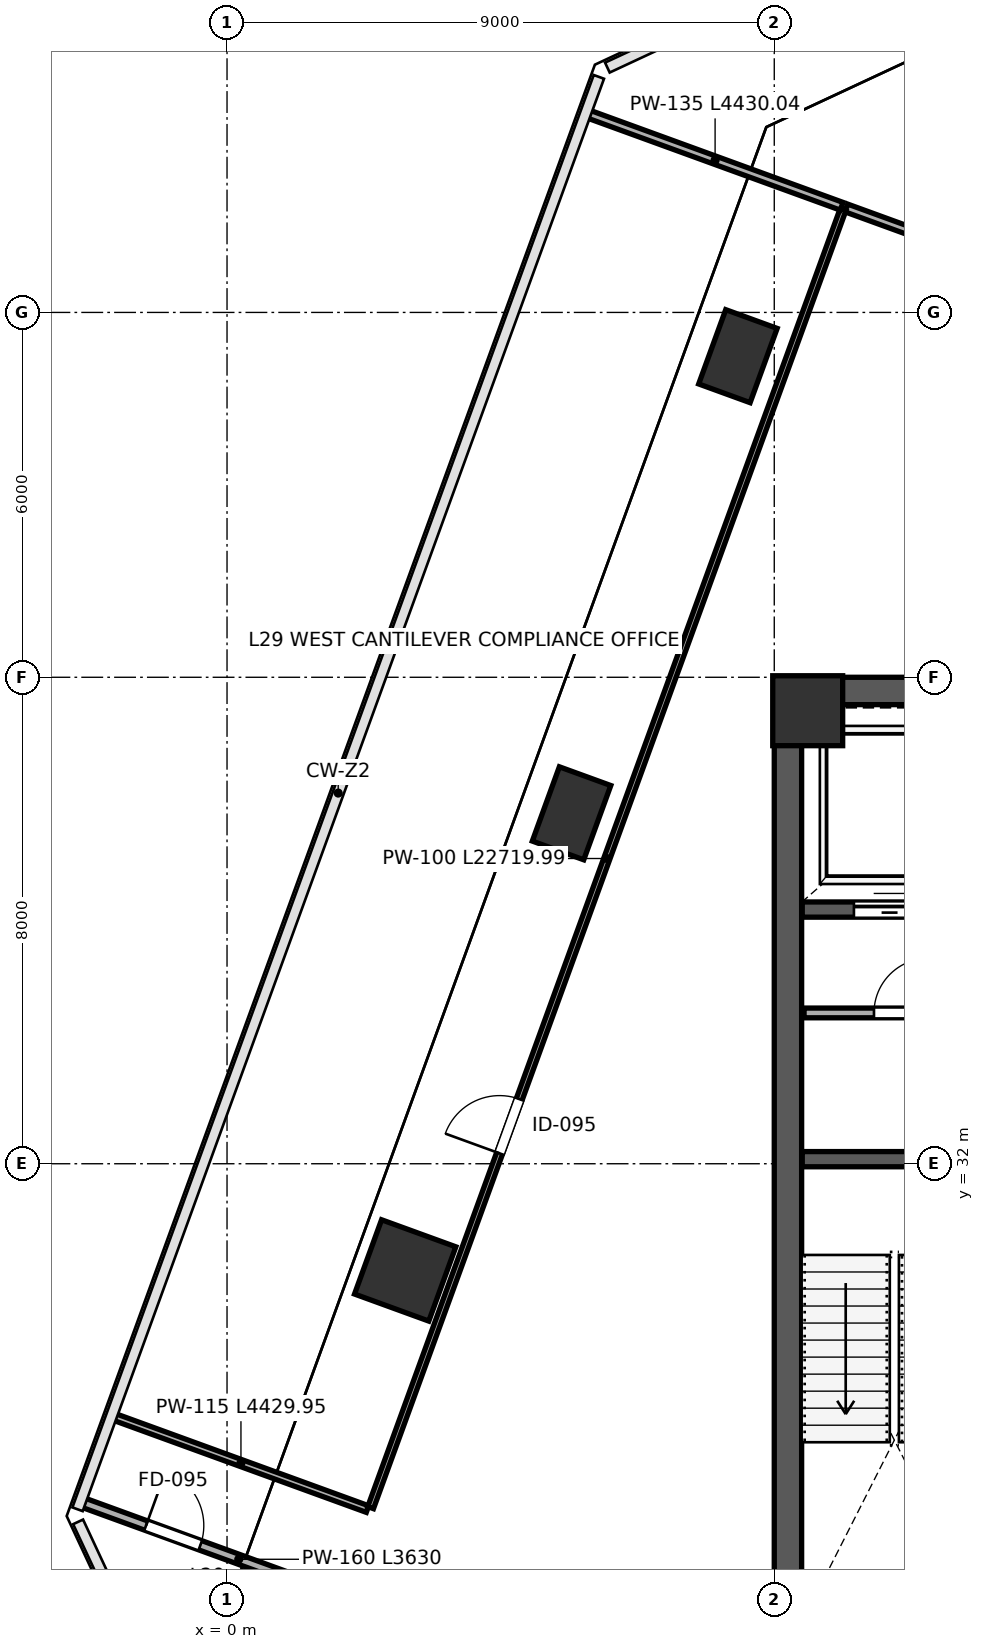
"""IFC4 building model, lengths in metres.
Left out: names, types, materials, properties, quantities, classifications, styles, units other than length and angle.
Written with IfcOpenShell. Run it as: python <this file> out.ifc"""

import sys

from ifc_helpers import new_model, si_unit, direction, frame, frame_2d, origin, origin_2d, place, context, subcontext, project, spatial, rectangle, extrude, clip, halfspace, source, transform, mapped, element, fill, save


model = new_model("IFC4")
c1 = context("Model", 3, precision=1e-05, world=origin(), true_north=direction((0.0, 1.0)))
c2 = subcontext(c1, "Body", "Model", "MODEL_VIEW")
j1 = project(units=[si_unit("LENGTHUNIT", "METRE"), si_unit("PLANEANGLEUNIT", "RADIAN")], contexts=[c1])
p1 = place(None, origin())
s1 = spatial("IfcSite", under=j1, at=p1, CompositionType="ELEMENT")
p2 = place(p1, origin())
s2 = spatial("IfcBuilding", under=s1, at=p2, CompositionType="ELEMENT")
p3 = place(p2, frame((0.0, 0.0, 133.0)))
s3 = spatial("IfcBuildingStorey", under=s2, at=p3, CompositionType="ELEMENT", Elevation=133.0)
m1 = source(origin(), c2, "Body", "SweptSolid", [
    extrude(rectangle(XDim=1.15, YDim=1.15, at=origin_2d()), origin(), (0.0, 0.0, 1.0), 4.198),
])
p4 = place(p3, frame((9.55, 39.45, 0.001), z_axis=(0.0, 0.0, 1.0), x_axis=(1.0, 0.0, 0.0)))
e1 = element("IfcColumn", 1, at=p4, inside=s3, PredefinedType="COLUMN", context=c2, shape_type="MappedRepresentation", body=[
    mapped(m1, transform((0.0, 0.0, 0.0), scale=1.0)),
])
p5 = place(p3, frame((2.93, 30.246, 0.0), z_axis=(-0.007984514186, 0.096045605421, 0.995344909673), x_axis=(0.964665591545, -0.261407243839, 0.032962848131)))
e2 = element("IfcColumn", 2, at=p5, inside=s3, PredefinedType="COLUMN", context=c2, shape_type="Clipping", body=[
    clip(clip(extrude(rectangle(XDim=1.3, YDim=1.3, at=origin_2d()), origin(), (0.0, 0.0, 1.0), 4.219), halfspace(frame((0.0, 0.0, 0.082), z_axis=(0.0, 0.0, -1.0), x_axis=(1.0, 0.0, 0.0)), False)), halfspace(frame((0.0, 0.0, 4.138), z_axis=(0.0, 0.0, 1.0), x_axis=(1.0, 0.0, 0.0)), False)),
])
p6 = place(p3, frame((5.666, 37.763, 0.0), z_axis=(0.030691149853, 0.081650040176, 0.996188397975), x_axis=(0.759723588942, -0.649561407736, 0.02983363848)))
e3 = element("IfcColumn", 3, at=p6, inside=s3, PredefinedType="PILASTER", context=c2, shape_type="Clipping", body=[
    clip(clip(extrude(rectangle(XDim=0.9, YDim=1.3, at=origin_2d()), origin(), (0.0, 0.0, 1.0), 4.216), halfspace(frame((0.0, 0.0, 0.068), z_axis=(0.0, 0.0, -1.0), x_axis=(1.0, 0.0, 0.0)), False)), halfspace(frame((0.0, 0.0, 4.148), z_axis=(0.0, 0.0, 1.0), x_axis=(1.0, 0.0, 0.0)), False)),
])
p7 = place(p3, frame((8.402, 45.281, 0.0), z_axis=(0.069430092702, 0.066942181047, 0.995338237296), x_axis=(0.407164247722, -0.912759098696, 0.03298640818)))
e4 = element("IfcColumn", 4, at=p7, inside=s3, PredefinedType="PILASTER", context=c2, shape_type="Clipping", body=[
    clip(clip(extrude(rectangle(XDim=0.9, YDim=1.3, at=origin_2d()), origin(), (0.0, 0.0, 1.0), 4.22), halfspace(frame((0.0, 0.0, 0.075), z_axis=(0.0, 0.0, -1.0), x_axis=(1.0, 0.0, 0.0)), False)), halfspace(frame((0.0, 0.0, 4.145), z_axis=(0.0, 0.0, 1.0), x_axis=(1.0, 0.0, 0.0)), False)),
])
p8 = place(p3, frame((9.225, 24.45, 0.0), z_axis=(0.0, 0.0, 1.0), x_axis=(0.0, 1.0, 0.0)))
e5 = element("IfcWall", 5, at=p8, inside=s3, PredefinedType="SHEAR", context=c2, shape_type="SweptSolid", body=[
    extrude(rectangle(XDim=15.1, YDim=0.45, at=frame_2d((7.55, 0.0))), origin(), (0.0, 0.0, 1.0), 3.96),
])
p9 = place(p3, frame((9.0, 39.775, 0.0), z_axis=(0.0, 0.0, 1.0), x_axis=(1.0, 0.0, 0.0)))
e6 = element("IfcWall", 6, at=p9, inside=s3, PredefinedType="SHEAR", context=c2, shape_type="SweptSolid", body=[
    extrude(rectangle(XDim=18.0, YDim=0.45, at=frame_2d((9.0, 0.0))), origin(), (0.0, 0.0, 1.0), 3.96),
])
p10 = place(p3, frame((9.46, 32.075, 0.0), z_axis=(0.0, 0.0, 1.0), x_axis=(1.0, 0.0, 0.0)))
e7 = element("IfcWall", 7, at=p10, inside=s3, PredefinedType="SHEAR", context=c2, shape_type="SweptSolid", body=[
    extrude(rectangle(XDim=3.29, YDim=0.25, at=frame_2d((1.645, 0.0))), origin(), (0.0, 0.0, 1.0), 3.96),
])
p11 = place(p3, frame((9.46, 36.18, 0.0), z_axis=(0.0, 0.0, 1.0), x_axis=(1.0, 0.0, 0.0)))
e8 = element("IfcWall", 8, at=p11, inside=s3, PredefinedType="SHEAR", context=c2, shape_type="SweptSolid", body=[
    extrude(rectangle(XDim=3.79, YDim=0.25, at=frame_2d((1.895, 0.0))), origin(), (0.0, 0.0, 1.0), 3.96),
])
p12 = place(p11, frame((2.62, 0.0, 0.0)))
e9 = element("IfcOpeningElement", 9, at=p12, cuts=e8, PredefinedType="OPENING", context=c2, shape_type="SweptSolid", body=[
    extrude(rectangle(XDim=0.85, YDim=2.1, at=frame_2d((0.425, 1.05))), frame((0.0, 0.135, 0.0), z_axis=(0.0, -1.0, 0.0), x_axis=(1.0, 0.0, 0.0)), (0.0, 0.0, 1.0), 0.27),
])
p13 = place(p11, frame((0.85, 0.0, 0.0)))
e10 = element("IfcOpeningElement", 10, at=p13, cuts=e8, PredefinedType="OPENING", context=c2, shape_type="SweptSolid", body=[
    extrude(rectangle(XDim=1.3, YDim=2.25, at=frame_2d((0.65, 1.125))), frame((0.0, 0.135, 0.0), z_axis=(0.0, -1.0, 0.0), x_axis=(1.0, 0.0, 0.0)), (0.0, 0.0, 1.0), 0.27),
])
p14 = place(p3, frame((9.49, 34.48, 0.0), z_axis=(0.0, 0.0, 1.0), x_axis=(1.0, 0.0, 0.0)))
e11 = element("IfcWall", 11, at=p14, inside=s3, PredefinedType="PARTITIONING", context=c2, shape_type="SweptSolid", body=[
    extrude(rectangle(XDim=3.7, YDim=0.16, at=frame_2d((1.85, 0.0))), origin(), (0.0, 0.0, 1.0), 3.96),
])
p15 = place(p14, frame((1.15, 0.0, 0.0)))
e12 = element("IfcOpeningElement", 12, at=p15, cuts=e11, PredefinedType="OPENING", context=c2, shape_type="SweptSolid", body=[
    extrude(rectangle(XDim=0.9, YDim=2.15, at=frame_2d((0.45, 1.075))), frame((0.0, 0.09, 0.0), z_axis=(0.0, -1.0, 0.0), x_axis=(1.0, 0.0, 0.0)), (0.0, 0.0, 1.0), 0.18),
])
p16 = place(p3, frame((-2.365, 26.427, 0.0), z_axis=(0.0, 0.0, 1.0), x_axis=(0.939671610829, -0.342077862192, 0.0)))
e13 = element("IfcWall", 13, at=p16, inside=s3, PredefinedType="PARTITIONING", context=c2, shape_type="SweptSolid", body=[
    extrude(rectangle(XDim=3.63, YDim=0.16, at=frame_2d((1.815, 0.0))), origin(), (0.0, 0.0, 1.0), 3.96),
])
p17 = place(p16, frame((1.1, 0.0, 0.0)))
e14 = element("IfcOpeningElement", 14, at=p17, cuts=e13, PredefinedType="OPENING", context=c2, shape_type="SweptSolid", body=[
    extrude(rectangle(XDim=0.95, YDim=2.15, at=frame_2d((0.475, 1.075))), frame((0.0, 0.09, 0.0), z_axis=(0.0, -1.0, 0.0), x_axis=(1.0, 0.0, 0.0)), (0.0, 0.0, 1.0), 0.18),
])
p18 = place(p3, frame((10.184, 47.719, 0.0), z_axis=(0.0, 0.0, 1.0), x_axis=(0.939691432235, -0.342023408826, 0.0)))
e15 = element("IfcWall", 15, at=p18, inside=s3, PredefinedType="PARTITIONING", context=c2, shape_type="SweptSolid", body=[
    extrude(rectangle(XDim=25.87, YDim=0.135, at=frame_2d((12.935, 0.0))), origin(), (0.0, 0.0, 1.0), 3.96),
])
p19 = place(p18, frame((18.8, 0.0, 0.0)))
e16 = element("IfcOpeningElement", 16, at=p19, cuts=e15, PredefinedType="OPENING", context=c2, shape_type="SweptSolid", body=[
    extrude(rectangle(XDim=0.95, YDim=2.15, at=frame_2d((0.475, 1.075))), frame((0.0, 0.078, 0.0), z_axis=(0.0, -1.0, 0.0), x_axis=(1.0, 0.0, 0.0)), (0.0, 0.0, 1.0), 0.155),
])
p20 = place(p3, frame((-1.853, 27.836, 0.0), z_axis=(0.0, 0.0, 1.0), x_axis=(0.939693620895, -0.342017395535, 0.0)))
e17 = element("IfcWall", 17, at=p20, inside=s3, PredefinedType="PARTITIONING", context=c2, shape_type="SweptSolid", body=[
    extrude(rectangle(XDim=4.43, YDim=0.115, at=frame_2d((2.215, 0.0))), origin(), (0.0, 0.0, 1.0), 3.96),
])
p21 = place(p3, frame((2.362, 26.345, 0.0), z_axis=(0.0, 0.0, 1.0), x_axis=(0.342021727767, 0.939692044095, 0.0)))
e18 = element("IfcWall", 18, at=p21, inside=s3, PredefinedType="PARTITIONING", context=c2, shape_type="SweptSolid", body=[
    extrude(rectangle(XDim=22.72, YDim=0.1, at=frame_2d((11.36, 0.0))), origin(), (0.0, 0.0, 1.0), 3.96),
])
p22 = place(p21, frame((6.2, 0.0, 0.0)))
e19 = element("IfcOpeningElement", 19, at=p22, cuts=e18, PredefinedType="OPENING", context=c2, shape_type="SweptSolid", body=[
    extrude(rectangle(XDim=0.95, YDim=2.15, at=frame_2d((0.475, 1.075))), frame((0.0, 0.06, 0.0), z_axis=(0.0, -1.0, 0.0), x_axis=(1.0, 0.0, 0.0)), (0.0, 0.0, 1.0), 0.12),
])
p23 = place(p3, frame((5.946, 49.261, 0.0), z_axis=(0.0, 0.0, 1.0), x_axis=(0.939693620895, -0.342017395535, 0.0)))
e20 = element("IfcWall", 20, at=p23, inside=s3, PredefinedType="PARTITIONING", context=c2, shape_type="SweptSolid", body=[
    extrude(rectangle(XDim=4.43, YDim=0.135, at=frame_2d((2.215, 0.0))), origin(), (0.0, 0.0, 1.0), 3.96),
])
m2 = source(origin(), c2, "Body", "SweptSolid", [
    extrude(rectangle(XDim=1.3, YDim=2.25, at=frame_2d((0.65, 1.125))), frame((0.0, 0.025, 0.0), z_axis=(0.0, -1.0, 0.0), x_axis=(1.0, 0.0, 0.0)), (0.0, 0.0, 1.0), 0.05),
])
p24 = place(p13, origin())
e21 = element("IfcDoor", 21, at=p24, inside=s3, OperationType="SLIDING_TO_LEFT", PredefinedType="DOOR", context=c2, shape_type="MappedRepresentation", body=[
    mapped(m2, transform((0.0, 0.0, 0.0), scale=1.0)),
])
fill(e10, e21)
m3 = source(origin(), c2, "Body", "SweptSolid", [
    extrude(rectangle(XDim=0.9, YDim=2.15, at=frame_2d((0.45, 1.075))), frame((0.0, 0.025, 0.0), z_axis=(0.0, -1.0, 0.0), x_axis=(1.0, 0.0, 0.0)), (0.0, 0.0, 1.0), 0.05),
])
p25 = place(p15, origin())
e22 = element("IfcDoor", 22, at=p25, inside=s3, OperationType="SINGLE_SWING_RIGHT", PredefinedType="DOOR", context=c2, shape_type="MappedRepresentation", body=[
    mapped(m3, transform((0.0, 0.0, 0.0), scale=1.0)),
])
fill(e12, e22)
m4 = source(origin(), c2, "Body", "SweptSolid", [
    extrude(rectangle(XDim=0.95, YDim=2.15, at=frame_2d((0.475, 1.075))), frame((0.0, 0.025, 0.0), z_axis=(0.0, -1.0, 0.0), x_axis=(1.0, 0.0, 0.0)), (0.0, 0.0, 1.0), 0.05),
])
p26 = place(p17, origin())
e23 = element("IfcDoor", 23, at=p26, inside=s3, OperationType="SINGLE_SWING_LEFT", PredefinedType="DOOR", context=c2, shape_type="MappedRepresentation", body=[
    mapped(m4, transform((0.0, 0.0, 0.0), scale=1.0)),
])
fill(e14, e23)
m5 = source(origin(), c2, "Body", "SweptSolid", [
    extrude(rectangle(XDim=0.95, YDim=2.15, at=frame_2d((0.475, 1.075))), frame((0.0, 0.025, 0.0), z_axis=(0.0, -1.0, 0.0), x_axis=(1.0, 0.0, 0.0)), (0.0, 0.0, 1.0), 0.05),
])
p27 = place(p22, origin())
e24 = element("IfcDoor", 24, at=p27, inside=s3, OperationType="SINGLE_SWING_LEFT", PredefinedType="DOOR", context=c2, shape_type="MappedRepresentation", body=[
    mapped(m5, transform((0.0, 0.0, 0.0), scale=1.0)),
])
fill(e19, e24)
save(model, sys.argv[1])
